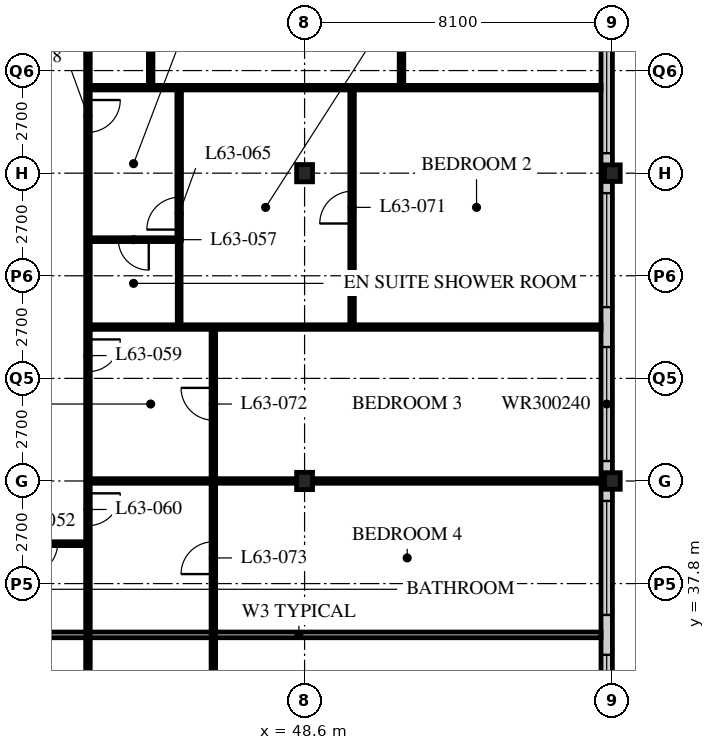
"""IFC4 building model, lengths in metres.
Left out: names, types, materials, properties, quantities, classifications, styles, units other than length and angle.
Written with IfcOpenShell. Run it as: python <this file> out.ifc"""

import sys

from ifc_helpers import new_model, si_unit, direction, frame, frame_2d, origin, origin_2d, place, context, subcontext, project, spatial, rectangle, i_section, extrude, element, fill, save


model = new_model("IFC4")
c1 = context("Model", 3, precision=1e-05, world=origin(), true_north=direction((0.0, 1.0)))
c2 = subcontext(c1, "Body", "Model", "MODEL_VIEW")
j1 = project(units=[si_unit("LENGTHUNIT", "METRE"), si_unit("PLANEANGLEUNIT", "RADIAN")], contexts=[c1])
p1 = place(None, origin())
s1 = spatial("IfcSite", under=j1, at=p1, CompositionType="ELEMENT")
p2 = place(p1, origin())
s2 = spatial("IfcBuilding", under=s1, at=p2, CompositionType="ELEMENT")
p3 = place(p2, frame((0.0, 0.0, 246.3)))
s3 = spatial("IfcBuildingStorey", under=s2, at=p3, CompositionType="ELEMENT", Elevation=246.3)
for number, where, z_axis, x_axis in (
    (1, (48.6, 40.5, 0.0), (0.0, 0.0, 1.0), (1.0, 0.0, 0.0)),
    (2, (48.6, 48.6, 0.0), (0.0, 0.0, 1.0), (1.0, 0.0, 0.0)),
):
    element("IfcColumn", number, at=place(p3, frame(where, z_axis=z_axis, x_axis=x_axis)), inside=s3, PredefinedType="COLUMN", context=c2, shape_type="SweptSolid", body=[
        extrude(i_section(OverallWidth=0.418, OverallDepth=0.456, WebThickness=0.042, FlangeThickness=0.067, FilletRadius=0.015, at=origin_2d()), origin(), (0.0, 0.0, 1.0), 3.9),
    ])
for number, where, z_axis, x_axis in (
    (3, (56.7, 40.5, 0.0), (0.0, 0.0, 1.0), (1.0, 0.0, 0.0)),
    (4, (56.7, 48.6, 0.0), (0.0, 0.0, 1.0), (1.0, 0.0, 0.0)),
):
    element("IfcColumn", number, at=place(p3, frame(where, z_axis=z_axis, x_axis=x_axis)), inside=s3, PredefinedType="COLUMN", context=c2, shape_type="SweptSolid", body=[
        extrude(i_section(OverallWidth=0.412, OverallDepth=0.437, WebThickness=0.036, FlangeThickness=0.058, FilletRadius=0.015, at=origin_2d()), origin(), (0.0, 0.0, 1.0), 3.9),
    ])
p4 = place(p3, frame((56.55, 24.6, 0.0), z_axis=(0.0, 0.0, 1.0), x_axis=(0.0, 1.0, 0.0)))
e5 = element("IfcWall", 5, at=p4, inside=s3, PredefinedType="SOLIDWALL", context=c2, shape_type="SweptSolid", body=[
    extrude(rectangle(XDim=32.1, YDim=0.3, at=frame_2d((16.05, 0.0))), origin(), (0.0, 0.0, 1.0), 3.69),
])
p5 = place(p4, frame((0.225, 0.0, 0.6)))
e6 = element("IfcOpeningElement", 6, at=p5, cuts=e5, PredefinedType="OPENING", context=c2, shape_type="SweptSolid", body=[
    extrude(rectangle(XDim=3.0, YDim=2.4, at=frame_2d((1.5, 1.2))), frame((0.0, 0.16, 0.0), z_axis=(0.0, -1.0, 0.0), x_axis=(1.0, 0.0, 0.0)), (0.0, 0.0, 1.0), 0.32),
])
p6 = place(p4, frame((4.275, 0.0, 0.6)))
e7 = element("IfcOpeningElement", 7, at=p6, cuts=e5, PredefinedType="OPENING", context=c2, shape_type="SweptSolid", body=[
    extrude(rectangle(XDim=3.0, YDim=2.4, at=frame_2d((1.5, 1.2))), frame((0.0, 0.16, 0.0), z_axis=(0.0, -1.0, 0.0), x_axis=(1.0, 0.0, 0.0)), (0.0, 0.0, 1.0), 0.32),
])
p7 = place(p4, frame((8.325, 0.0, 0.6)))
e8 = element("IfcOpeningElement", 8, at=p7, cuts=e5, PredefinedType="OPENING", context=c2, shape_type="SweptSolid", body=[
    extrude(rectangle(XDim=3.0, YDim=2.4, at=frame_2d((1.5, 1.2))), frame((0.0, 0.16, 0.0), z_axis=(0.0, -1.0, 0.0), x_axis=(1.0, 0.0, 0.0)), (0.0, 0.0, 1.0), 0.32),
])
p8 = place(p4, frame((12.375, 0.0, 0.6)))
e9 = element("IfcOpeningElement", 9, at=p8, cuts=e5, PredefinedType="OPENING", context=c2, shape_type="SweptSolid", body=[
    extrude(rectangle(XDim=3.0, YDim=2.4, at=frame_2d((1.5, 1.2))), frame((0.0, 0.16, 0.0), z_axis=(0.0, -1.0, 0.0), x_axis=(1.0, 0.0, 0.0)), (0.0, 0.0, 1.0), 0.32),
])
p9 = place(p4, frame((16.425, 0.0, 0.6)))
e10 = element("IfcOpeningElement", 10, at=p9, cuts=e5, PredefinedType="OPENING", context=c2, shape_type="SweptSolid", body=[
    extrude(rectangle(XDim=3.0, YDim=2.4, at=frame_2d((1.5, 1.2))), frame((0.0, 0.16, 0.0), z_axis=(0.0, -1.0, 0.0), x_axis=(1.0, 0.0, 0.0)), (0.0, 0.0, 1.0), 0.32),
])
p10 = place(p4, frame((20.475, 0.0, 0.6)))
e11 = element("IfcOpeningElement", 11, at=p10, cuts=e5, PredefinedType="OPENING", context=c2, shape_type="SweptSolid", body=[
    extrude(rectangle(XDim=3.0, YDim=2.4, at=frame_2d((1.5, 1.2))), frame((0.0, 0.16, 0.0), z_axis=(0.0, -1.0, 0.0), x_axis=(1.0, 0.0, 0.0)), (0.0, 0.0, 1.0), 0.32),
])
p11 = place(p4, frame((24.525, 0.0, 0.6)))
e12 = element("IfcOpeningElement", 12, at=p11, cuts=e5, PredefinedType="OPENING", context=c2, shape_type="SweptSolid", body=[
    extrude(rectangle(XDim=3.0, YDim=2.4, at=frame_2d((1.5, 1.2))), frame((0.0, 0.16, 0.0), z_axis=(0.0, -1.0, 0.0), x_axis=(1.0, 0.0, 0.0)), (0.0, 0.0, 1.0), 0.32),
])
p12 = place(p4, frame((28.575, 0.0, 0.6)))
e13 = element("IfcOpeningElement", 13, at=p12, cuts=e5, PredefinedType="OPENING", context=c2, shape_type="SweptSolid", body=[
    extrude(rectangle(XDim=3.0, YDim=2.4, at=frame_2d((1.5, 1.2))), frame((0.0, 0.16, 0.0), z_axis=(0.0, -1.0, 0.0), x_axis=(1.0, 0.0, 0.0)), (0.0, 0.0, 1.0), 0.32),
])
p13 = place(p3, frame((42.9, 22.5, 0.0), z_axis=(0.0, 0.0, 1.0), x_axis=(0.0, 1.0, 0.0)))
e14 = element("IfcWall", 14, at=p13, inside=s3, PredefinedType="PARTITIONING", context=c2, shape_type="SweptSolid", body=[
    extrude(rectangle(XDim=13.95, YDim=0.12, at=frame_2d((6.975, 0.0))), origin(), (0.0, 0.0, 1.0), 3.69),
])
p14 = place(p13, frame((2.125, 0.0, 0.0)))
e15 = element("IfcOpeningElement", 15, at=p14, cuts=e14, PredefinedType="OPENING", context=c2, shape_type="SweptSolid", body=[
    extrude(rectangle(XDim=0.85, YDim=2.1, at=frame_2d((0.425, 1.05))), frame((0.0, 0.07, 0.0), z_axis=(0.0, -1.0, 0.0), x_axis=(1.0, 0.0, 0.0)), (0.0, 0.0, 1.0), 0.14),
])
p15 = place(p13, frame((6.175, 0.0, 0.0)))
e16 = element("IfcOpeningElement", 16, at=p15, cuts=e14, PredefinedType="OPENING", context=c2, shape_type="SweptSolid", body=[
    extrude(rectangle(XDim=0.85, YDim=2.1, at=frame_2d((0.425, 1.05))), frame((0.0, 0.07, 0.0), z_axis=(0.0, -1.0, 0.0), x_axis=(1.0, 0.0, 0.0)), (0.0, 0.0, 1.0), 0.14),
])
p16 = place(p13, frame((10.225, 0.0, 0.0)))
e17 = element("IfcOpeningElement", 17, at=p16, cuts=e14, PredefinedType="OPENING", context=c2, shape_type="SweptSolid", body=[
    extrude(rectangle(XDim=0.85, YDim=2.1, at=frame_2d((0.425, 1.05))), frame((0.0, 0.07, 0.0), z_axis=(0.0, -1.0, 0.0), x_axis=(1.0, 0.0, 0.0)), (0.0, 0.0, 1.0), 0.14),
])
p17 = place(p3, frame((40.5, 36.45, 0.0), z_axis=(0.0, 0.0, 1.0), x_axis=(1.0, 0.0, 0.0)))
e18 = element("IfcWall", 18, at=p17, inside=s3, PredefinedType="PARTITIONING", context=c2, shape_type="SweptSolid", body=[
    extrude(rectangle(XDim=15.9, YDim=0.15, at=frame_2d((7.95, 0.0))), origin(), (0.0, 0.0, 1.0), 3.69),
])
p18 = place(p3, frame((40.5, 38.85, 0.0), z_axis=(0.0, 0.0, 1.0), x_axis=(1.0, 0.0, 0.0)))
e19 = element("IfcWall", 19, at=p18, inside=s3, PredefinedType="PARTITIONING", context=c2, shape_type="SweptSolid", body=[
    extrude(rectangle(XDim=2.4, YDim=0.1, at=frame_2d((1.2, 0.0))), origin(), (0.0, 0.0, 1.0), 3.69),
])
p19 = place(p18, frame((0.8, 0.0, 0.0)))
e20 = element("IfcOpeningElement", 20, at=p19, cuts=e19, PredefinedType="OPENING", context=c2, shape_type="SweptSolid", body=[
    extrude(rectangle(XDim=0.8, YDim=2.1, at=frame_2d((0.4, 1.05))), frame((0.0, 0.06, 0.0), z_axis=(0.0, -1.0, 0.0), x_axis=(1.0, 0.0, 0.0)), (0.0, 0.0, 1.0), 0.12),
])
p20 = place(p3, frame((42.9, 52.65, 0.0), z_axis=(0.0, 0.0, 1.0), x_axis=(0.0, -1.0, 0.0)))
e21 = element("IfcWall", 21, at=p20, inside=s3, PredefinedType="PARTITIONING", context=c2, shape_type="SweptSolid", body=[
    extrude(rectangle(XDim=16.2, YDim=0.12, at=frame_2d((8.1, 0.0))), origin(), (0.0, 0.0, 1.0), 3.69),
])
p21 = place(p20, frame((2.125, 0.0, 0.0)))
e22 = element("IfcOpeningElement", 22, at=p21, cuts=e21, PredefinedType="OPENING", context=c2, shape_type="SweptSolid", body=[
    extrude(rectangle(XDim=0.85, YDim=2.1, at=frame_2d((0.425, 1.05))), frame((0.0, 0.07, 0.0), z_axis=(0.0, -1.0, 0.0), x_axis=(1.0, 0.0, 0.0)), (0.0, 0.0, 1.0), 0.14),
])
p22 = place(p20, frame((8.425, 0.0, 0.0)))
e23 = element("IfcOpeningElement", 23, at=p22, cuts=e21, PredefinedType="OPENING", context=c2, shape_type="SweptSolid", body=[
    extrude(rectangle(XDim=0.85, YDim=2.1, at=frame_2d((0.425, 1.05))), frame((0.0, 0.07, 0.0), z_axis=(0.0, -1.0, 0.0), x_axis=(1.0, 0.0, 0.0)), (0.0, 0.0, 1.0), 0.14),
])
p23 = place(p20, frame((12.475, 0.0, 0.0)))
e24 = element("IfcOpeningElement", 24, at=p23, cuts=e21, PredefinedType="OPENING", context=c2, shape_type="SweptSolid", body=[
    extrude(rectangle(XDim=0.85, YDim=2.1, at=frame_2d((0.425, 1.05))), frame((0.0, 0.07, 0.0), z_axis=(0.0, -1.0, 0.0), x_axis=(1.0, 0.0, 0.0)), (0.0, 0.0, 1.0), 0.14),
])
p24 = place(p3, frame((42.9, 50.85, 0.0), z_axis=(0.0, 0.0, 1.0), x_axis=(1.0, 0.0, 0.0)))
e25 = element("IfcWall", 25, at=p24, inside=s3, PredefinedType="PARTITIONING", context=c2, shape_type="SweptSolid", body=[
    extrude(rectangle(XDim=13.5, YDim=0.12, at=frame_2d((6.75, 0.0))), origin(), (0.0, 0.0, 1.0), 3.69),
])
p25 = place(p3, frame((44.55, 64.5, 0.0), z_axis=(0.0, 0.0, 1.0), x_axis=(0.0, -1.0, 0.0)))
e26 = element("IfcWall", 26, at=p25, inside=s3, PredefinedType="PARTITIONING", context=c2, shape_type="SweptSolid", body=[
    extrude(rectangle(XDim=13.65, YDim=0.12, at=frame_2d((6.825, 0.0))), origin(), (0.0, 0.0, 1.0), 3.69),
])
p26 = place(p25, frame((8.425, 0.0, 0.0)))
e27 = element("IfcOpeningElement", 27, at=p26, cuts=e26, PredefinedType="OPENING", context=c2, shape_type="SweptSolid", body=[
    extrude(rectangle(XDim=0.85, YDim=2.1, at=frame_2d((0.425, 1.05))), frame((0.0, 0.07, 0.0), z_axis=(0.0, -1.0, 0.0), x_axis=(1.0, 0.0, 0.0)), (0.0, 0.0, 1.0), 0.14),
])
p27 = place(p25, frame((2.5, 0.0, 0.0)))
e28 = element("IfcOpeningElement", 28, at=p27, cuts=e26, PredefinedType="OPENING", context=c2, shape_type="SweptSolid", body=[
    extrude(rectangle(XDim=0.85, YDim=2.1, at=frame_2d((0.425, 1.05))), frame((0.0, 0.07, 0.0), z_axis=(0.0, -1.0, 0.0), x_axis=(1.0, 0.0, 0.0)), (0.0, 0.0, 1.0), 0.14),
])
p28 = place(p3, frame((42.9, 46.85, 0.0), z_axis=(0.0, 0.0, 1.0), x_axis=(1.0, 0.0, 0.0)))
e29 = element("IfcWall", 29, at=p28, inside=s3, PredefinedType="PARTITIONING", context=c2, shape_type="SweptSolid", body=[
    extrude(rectangle(XDim=2.4, YDim=0.1, at=frame_2d((1.2, 0.0))), origin(), (0.0, 0.0, 1.0), 3.69),
])
p29 = place(p28, frame((0.8, 0.0, 0.0)))
e30 = element("IfcOpeningElement", 30, at=p29, cuts=e29, PredefinedType="OPENING", context=c2, shape_type="SweptSolid", body=[
    extrude(rectangle(XDim=0.8, YDim=2.1, at=frame_2d((0.4, 1.05))), frame((0.0, 0.06, 0.0), z_axis=(0.0, -1.0, 0.0), x_axis=(1.0, 0.0, 0.0)), (0.0, 0.0, 1.0), 0.12),
])
p30 = place(p3, frame((45.3, 46.85, 0.0), z_axis=(0.0, 0.0, 1.0), x_axis=(0.0, -1.0, 0.0)))
e31 = element("IfcWall", 31, at=p30, inside=s3, PredefinedType="PARTITIONING", context=c2, shape_type="SweptSolid", body=[
    extrude(rectangle(XDim=2.3, YDim=0.1, at=frame_2d((1.15, 0.0))), origin(), (0.0, 0.0, 1.0), 3.69),
])
p31 = place(p3, frame((42.9, 44.55, 0.0), z_axis=(0.0, 0.0, 1.0), x_axis=(1.0, 0.0, 0.0)))
e32 = element("IfcWall", 32, at=p31, inside=s3, PredefinedType="PARTITIONING", context=c2, shape_type="SweptSolid", body=[
    extrude(rectangle(XDim=13.5, YDim=0.12, at=frame_2d((6.75, 0.0))), origin(), (0.0, 0.0, 1.0), 3.69),
])
p32 = place(p3, frame((42.9, 40.5, 0.0), z_axis=(0.0, 0.0, 1.0), x_axis=(1.0, 0.0, 0.0)))
e33 = element("IfcWall", 33, at=p32, inside=s3, PredefinedType="PARTITIONING", context=c2, shape_type="SweptSolid", body=[
    extrude(rectangle(XDim=13.5, YDim=0.12, at=frame_2d((6.75, 0.0))), origin(), (0.0, 0.0, 1.0), 3.078),
])
p33 = place(p3, frame((45.3, 50.85, 0.0), z_axis=(0.0, 0.0, 1.0), x_axis=(0.0, -1.0, 0.0)))
e34 = element("IfcWall", 34, at=p33, inside=s3, PredefinedType="PARTITIONING", context=c2, shape_type="SweptSolid", body=[
    extrude(rectangle(XDim=4.01, YDim=0.12, at=frame_2d((2.005, 0.0))), origin(), (0.0, 0.0, 1.0), 3.69),
])
p34 = place(p33, frame((2.885, 0.0, 0.0)))
e35 = element("IfcOpeningElement", 35, at=p34, cuts=e34, PredefinedType="OPENING", context=c2, shape_type="SweptSolid", body=[
    extrude(rectangle(XDim=0.85, YDim=2.1, at=frame_2d((0.425, 1.05))), frame((0.0, 0.07, 0.0), z_axis=(0.0, -1.0, 0.0), x_axis=(1.0, 0.0, 0.0)), (0.0, 0.0, 1.0), 0.14),
])
p35 = place(p3, frame((46.2, 28.35, 0.0), z_axis=(0.0, 0.0, 1.0), x_axis=(0.0, 1.0, 0.0)))
e36 = element("IfcWall", 36, at=p35, inside=s3, PredefinedType="PARTITIONING", context=c2, shape_type="SweptSolid", body=[
    extrude(rectangle(XDim=16.2, YDim=0.12, at=frame_2d((8.1, 0.0))), origin(), (0.0, 0.0, 1.0), 3.69),
])
p36 = place(p35, frame((1.6, 0.0, 0.0)))
e37 = element("IfcOpeningElement", 37, at=p36, cuts=e36, PredefinedType="OPENING", context=c2, shape_type="SweptSolid", body=[
    extrude(rectangle(XDim=0.85, YDim=2.1, at=frame_2d((0.425, 1.05))), frame((0.0, 0.07, 0.0), z_axis=(0.0, -1.0, 0.0), x_axis=(1.0, 0.0, 0.0)), (0.0, 0.0, 1.0), 0.14),
])
p37 = place(p35, frame((5.65, 0.0, 0.0)))
e38 = element("IfcOpeningElement", 38, at=p37, cuts=e36, PredefinedType="OPENING", context=c2, shape_type="SweptSolid", body=[
    extrude(rectangle(XDim=0.85, YDim=2.1, at=frame_2d((0.425, 1.05))), frame((0.0, 0.07, 0.0), z_axis=(0.0, -1.0, 0.0), x_axis=(1.0, 0.0, 0.0)), (0.0, 0.0, 1.0), 0.14),
])
p38 = place(p35, frame((13.75, 0.0, 0.0)))
e39 = element("IfcOpeningElement", 39, at=p38, cuts=e36, PredefinedType="OPENING", context=c2, shape_type="SweptSolid", body=[
    extrude(rectangle(XDim=0.85, YDim=2.1, at=frame_2d((0.425, 1.05))), frame((0.0, 0.07, 0.0), z_axis=(0.0, -1.0, 0.0), x_axis=(1.0, 0.0, 0.0)), (0.0, 0.0, 1.0), 0.14),
])
p39 = place(p35, frame((9.7, 0.0, 0.0)))
e40 = element("IfcOpeningElement", 40, at=p39, cuts=e36, PredefinedType="OPENING", context=c2, shape_type="SweptSolid", body=[
    extrude(rectangle(XDim=0.85, YDim=2.1, at=frame_2d((0.425, 1.05))), frame((0.0, 0.07, 0.0), z_axis=(0.0, -1.0, 0.0), x_axis=(1.0, 0.0, 0.0)), (0.0, 0.0, 1.0), 0.14),
])
p40 = place(p3, frame((51.15, 50.85, 0.0), z_axis=(0.0, 0.0, 1.0), x_axis=(0.0, 1.0, 0.0)))
e41 = element("IfcWall", 41, at=p40, inside=s3, PredefinedType="PARTITIONING", context=c2, shape_type="SweptSolid", body=[
    extrude(rectangle(XDim=7.8, YDim=0.12, at=frame_2d((3.9, 0.0))), origin(), (0.0, 0.0, 1.0), 3.69),
])
p41 = place(p40, frame((3.475, 0.0, 0.0)))
e42 = element("IfcOpeningElement", 42, at=p41, cuts=e41, PredefinedType="OPENING", context=c2, shape_type="SweptSolid", body=[
    extrude(rectangle(XDim=0.85, YDim=2.1, at=frame_2d((0.425, 1.05))), frame((0.0, 0.07, 0.0), z_axis=(0.0, -1.0, 0.0), x_axis=(1.0, 0.0, 0.0)), (0.0, 0.0, 1.0), 0.14),
])
p42 = place(p3, frame((49.85, 44.55, 0.0), z_axis=(0.0, 0.0, 1.0), x_axis=(0.0, 1.0, 0.0)))
e43 = element("IfcWall", 43, at=p42, inside=s3, PredefinedType="PARTITIONING", context=c2, shape_type="SweptSolid", body=[
    extrude(rectangle(XDim=6.3, YDim=0.12, at=frame_2d((3.15, 0.0))), origin(), (0.0, 0.0, 1.0), 3.69),
])
p43 = place(p42, frame((2.725, 0.0, 0.0)))
e44 = element("IfcOpeningElement", 44, at=p43, cuts=e43, PredefinedType="OPENING", context=c2, shape_type="SweptSolid", body=[
    extrude(rectangle(XDim=0.85, YDim=2.1, at=frame_2d((0.425, 1.05))), frame((0.0, 0.07, 0.0), z_axis=(0.0, -1.0, 0.0), x_axis=(1.0, 0.0, 0.0)), (0.0, 0.0, 1.0), 0.14),
])
p44 = place(p7, origin())
e45 = element("IfcWindow", 45, at=p44, inside=s3, PartitioningType="SINGLE_PANEL", PredefinedType="WINDOW", context=c2, shape_type="SweptSolid", body=[
    extrude(rectangle(XDim=3.0, YDim=2.4, at=frame_2d((1.5, 1.2))), frame((0.0, 0.03, 0.0), z_axis=(0.0, -1.0, 0.0), x_axis=(1.0, 0.0, 0.0)), (0.0, 0.0, 1.0), 0.06),
])
fill(e8, e45)
p45 = place(p8, origin())
e46 = element("IfcWindow", 46, at=p45, inside=s3, PartitioningType="SINGLE_PANEL", PredefinedType="WINDOW", context=c2, shape_type="SweptSolid", body=[
    extrude(rectangle(XDim=3.0, YDim=2.4, at=frame_2d((1.5, 1.2))), frame((0.0, 0.03, 0.0), z_axis=(0.0, -1.0, 0.0), x_axis=(1.0, 0.0, 0.0)), (0.0, 0.0, 1.0), 0.06),
])
fill(e9, e46)
p46 = place(p9, origin())
e47 = element("IfcWindow", 47, at=p46, inside=s3, PartitioningType="SINGLE_PANEL", PredefinedType="WINDOW", context=c2, shape_type="SweptSolid", body=[
    extrude(rectangle(XDim=3.0, YDim=2.4, at=frame_2d((1.5, 1.2))), frame((0.0, 0.03, 0.0), z_axis=(0.0, -1.0, 0.0), x_axis=(1.0, 0.0, 0.0)), (0.0, 0.0, 1.0), 0.06),
])
fill(e10, e47)
p47 = place(p10, origin())
e48 = element("IfcWindow", 48, at=p47, inside=s3, PartitioningType="SINGLE_PANEL", PredefinedType="WINDOW", context=c2, shape_type="SweptSolid", body=[
    extrude(rectangle(XDim=3.0, YDim=2.4, at=frame_2d((1.5, 1.2))), frame((0.0, 0.03, 0.0), z_axis=(0.0, -1.0, 0.0), x_axis=(1.0, 0.0, 0.0)), (0.0, 0.0, 1.0), 0.06),
])
fill(e11, e48)
p48 = place(p11, origin())
e49 = element("IfcWindow", 49, at=p48, inside=s3, PartitioningType="SINGLE_PANEL", PredefinedType="WINDOW", context=c2, shape_type="SweptSolid", body=[
    extrude(rectangle(XDim=3.0, YDim=2.4, at=frame_2d((1.5, 1.2))), frame((0.0, 0.03, 0.0), z_axis=(0.0, -1.0, 0.0), x_axis=(1.0, 0.0, 0.0)), (0.0, 0.0, 1.0), 0.06),
])
fill(e12, e49)
p49 = place(p19, origin())
e50 = element("IfcDoor", 50, at=p49, inside=s3, OperationType="SINGLE_SWING_RIGHT", PredefinedType="DOOR", context=c2, shape_type="SweptSolid", body=[
    extrude(rectangle(XDim=0.8, YDim=2.1, at=frame_2d((0.4, 1.05))), frame((0.0, 0.025, 0.0), z_axis=(0.0, -1.0, 0.0), x_axis=(1.0, 0.0, 0.0)), (0.0, 0.0, 1.0), 0.05),
])
fill(e20, e50)
p50 = place(p29, origin())
e51 = element("IfcDoor", 51, at=p50, inside=s3, OperationType="SINGLE_SWING_LEFT", PredefinedType="DOOR", context=c2, shape_type="SweptSolid", body=[
    extrude(rectangle(XDim=0.8, YDim=2.1, at=frame_2d((0.4, 1.05))), frame((0.0, 0.025, 0.0), z_axis=(0.0, -1.0, 0.0), x_axis=(1.0, 0.0, 0.0)), (0.0, 0.0, 1.0), 0.05),
])
fill(e30, e51)
p51 = place(p21, origin())
e52 = element("IfcDoor", 52, at=p51, inside=s3, OperationType="SINGLE_SWING_LEFT", PredefinedType="DOOR", context=c2, shape_type="SweptSolid", body=[
    extrude(rectangle(XDim=0.85, YDim=2.1, at=frame_2d((0.425, 1.05))), frame((0.0, 0.025, 0.0), z_axis=(0.0, -1.0, 0.0), x_axis=(1.0, 0.0, 0.0)), (0.0, 0.0, 1.0), 0.05),
])
fill(e22, e52)
p52 = place(p22, origin())
e53 = element("IfcDoor", 53, at=p52, inside=s3, OperationType="SINGLE_SWING_LEFT", PredefinedType="DOOR", context=c2, shape_type="SweptSolid", body=[
    extrude(rectangle(XDim=0.85, YDim=2.1, at=frame_2d((0.425, 1.05))), frame((0.0, 0.025, 0.0), z_axis=(0.0, -1.0, 0.0), x_axis=(1.0, 0.0, 0.0)), (0.0, 0.0, 1.0), 0.05),
])
fill(e23, e53)
p53 = place(p23, origin())
e54 = element("IfcDoor", 54, at=p53, inside=s3, OperationType="SINGLE_SWING_LEFT", PredefinedType="DOOR", context=c2, shape_type="SweptSolid", body=[
    extrude(rectangle(XDim=0.85, YDim=2.1, at=frame_2d((0.425, 1.05))), frame((0.0, 0.025, 0.0), z_axis=(0.0, -1.0, 0.0), x_axis=(1.0, 0.0, 0.0)), (0.0, 0.0, 1.0), 0.05),
])
fill(e24, e54)
p54 = place(p34, origin())
e55 = element("IfcDoor", 55, at=p54, inside=s3, OperationType="SINGLE_SWING_LEFT", PredefinedType="DOOR", context=c2, shape_type="SweptSolid", body=[
    extrude(rectangle(XDim=0.85, YDim=2.1, at=frame_2d((0.425, 1.05))), frame((0.0, 0.025, 0.0), z_axis=(0.0, -1.0, 0.0), x_axis=(1.0, 0.0, 0.0)), (0.0, 0.0, 1.0), 0.05),
])
fill(e35, e55)
p55 = place(p43, origin())
e56 = element("IfcDoor", 56, at=p55, inside=s3, OperationType="SINGLE_SWING_LEFT", PredefinedType="DOOR", context=c2, shape_type="SweptSolid", body=[
    extrude(rectangle(XDim=0.85, YDim=2.1, at=frame_2d((0.425, 1.05))), frame((0.0, 0.025, 0.0), z_axis=(0.0, -1.0, 0.0), x_axis=(1.0, 0.0, 0.0)), (0.0, 0.0, 1.0), 0.05),
])
fill(e44, e56)
p56 = place(p38, origin())
e57 = element("IfcDoor", 57, at=p56, inside=s3, OperationType="SINGLE_SWING_RIGHT", PredefinedType="DOOR", context=c2, shape_type="SweptSolid", body=[
    extrude(rectangle(XDim=0.85, YDim=2.1, at=frame_2d((0.425, 1.05))), frame((0.0, 0.025, 0.0), z_axis=(0.0, -1.0, 0.0), x_axis=(1.0, 0.0, 0.0)), (0.0, 0.0, 1.0), 0.05),
])
fill(e39, e57)
p57 = place(p39, origin())
e58 = element("IfcDoor", 58, at=p57, inside=s3, OperationType="SINGLE_SWING_LEFT", PredefinedType="DOOR", context=c2, shape_type="SweptSolid", body=[
    extrude(rectangle(XDim=0.85, YDim=2.1, at=frame_2d((0.425, 1.05))), frame((0.0, 0.025, 0.0), z_axis=(0.0, -1.0, 0.0), x_axis=(1.0, 0.0, 0.0)), (0.0, 0.0, 1.0), 0.05),
])
fill(e40, e58)
save(model, sys.argv[1])
